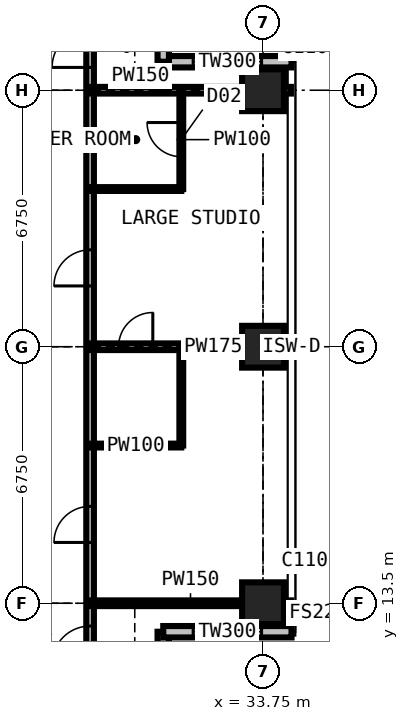
"""IFC4 building model, lengths in metres.
Left out: names, types, materials, properties, quantities, classifications, styles, units other than length and angle.
Written with IfcOpenShell. Run it as: python <this file> out.ifc"""

import sys

from ifc_helpers import new_model, si_unit, direction, frame, frame_2d, origin, origin_2d, place, context, subcontext, project, spatial, rectangle, extrude, element, fill, save


model = new_model("IFC4")
c1 = context("Model", 3, precision=1e-05, world=origin(), true_north=direction((0.0, 1.0)))
c2 = subcontext(c1, "Body", "Model", "MODEL_VIEW")
j1 = project(units=[si_unit("LENGTHUNIT", "METRE"), si_unit("PLANEANGLEUNIT", "RADIAN")], contexts=[c1])
p1 = place(None, origin())
s1 = spatial("IfcSite", under=j1, at=p1, CompositionType="ELEMENT")
p2 = place(p1, origin())
s2 = spatial("IfcBuilding", under=s1, at=p2, CompositionType="ELEMENT")
p3 = place(p2, frame((0.0, 0.0, 215.1)))
s3 = spatial("IfcBuildingStorey", under=s2, at=p3, CompositionType="ELEMENT", Elevation=215.1)
for number, where, z_axis, x_axis in (
    (1, (33.75, 13.5, 0.0), (0.0, 0.0, 1.0), (1.0, 0.0, 0.0)),
    (2, (33.75, 20.25, 0.0), (0.0, 0.0, 1.0), (1.0, 0.0, 0.0)),
    (3, (33.75, 27.0, 0.0), (0.0, 0.0, 1.0), (1.0, 0.0, 0.0)),
):
    element("IfcColumn", number, at=place(p3, frame(where, z_axis=z_axis, x_axis=x_axis)), inside=s3, PredefinedType="COLUMN", context=c2, shape_type="SweptSolid", body=[
        extrude(rectangle(XDim=1.1, YDim=1.1, at=origin_2d()), origin(), (0.0, 0.0, 1.0), 3.6),
    ])
p4 = place(p3, frame((34.5, 27.75, 0.0), z_axis=(0.0, 0.0, 1.0), x_axis=(-1.0, 0.0, 0.0)))
e4 = element("IfcWall", 4, at=p4, inside=s3, PredefinedType="SOLIDWALL", context=c2, shape_type="SweptSolid", body=[
    extrude(rectangle(XDim=3.375, YDim=0.3, at=frame_2d((1.688, 0.0))), origin(), (0.0, 0.0, 1.0), 3.375),
])
p5 = place(p4, frame((0.788, 0.0, 0.6)))
e5 = element("IfcOpeningElement", 5, at=p5, cuts=e4, PredefinedType="OPENING", context=c2, shape_type="SweptSolid", body=[
    extrude(rectangle(XDim=1.8, YDim=2.1, at=frame_2d((0.9, 1.05))), frame((0.0, 0.16, 0.0), z_axis=(0.0, -1.0, 0.0), x_axis=(1.0, 0.0, 0.0)), (0.0, 0.0, 1.0), 0.32),
])
p6 = place(p3, frame((31.125, 27.75, 0.0), z_axis=(0.0, 0.0, 1.0), x_axis=(0.0, 1.0, 0.0)))
e6 = element("IfcWall", 6, at=p6, inside=s3, PredefinedType="SOLIDWALL", context=c2, shape_type="SweptSolid", body=[
    extrude(rectangle(XDim=3.375, YDim=0.3, at=frame_2d((1.688, 0.0))), origin(), (0.0, 0.0, 1.0), 3.375),
])
p7 = place(p6, frame((1.663, 0.0, 0.9)))
e7 = element("IfcOpeningElement", 7, at=p7, cuts=e6, PredefinedType="OPENING", context=c2, shape_type="SweptSolid", body=[
    extrude(rectangle(XDim=1.5, YDim=1.8, at=frame_2d((0.75, 0.9))), frame((0.0, 0.16, 0.0), z_axis=(0.0, -1.0, 0.0), x_axis=(1.0, 0.0, 0.0)), (0.0, 0.0, 1.0), 0.32),
])
p8 = place(p3, frame((31.125, 9.375, 0.0), z_axis=(0.0, 0.0, 1.0), x_axis=(0.0, 1.0, 0.0)))
e8 = element("IfcWall", 8, at=p8, inside=s3, PredefinedType="SOLIDWALL", context=c2, shape_type="SweptSolid", body=[
    extrude(rectangle(XDim=3.375, YDim=0.3, at=frame_2d((1.688, 0.0))), origin(), (0.0, 0.0, 1.0), 3.375),
])
p9 = place(p8, frame((0.788, 0.0, 0.6)))
e9 = element("IfcOpeningElement", 9, at=p9, cuts=e8, PredefinedType="OPENING", context=c2, shape_type="SweptSolid", body=[
    extrude(rectangle(XDim=1.8, YDim=2.1, at=frame_2d((0.9, 1.05))), frame((0.0, 0.16, 0.0), z_axis=(0.0, -1.0, 0.0), x_axis=(1.0, 0.0, 0.0)), (0.0, 0.0, 1.0), 0.32),
])
p10 = place(p3, frame((31.125, 12.75, 0.0), z_axis=(0.0, 0.0, 1.0), x_axis=(1.0, 0.0, 0.0)))
e10 = element("IfcWall", 10, at=p10, inside=s3, PredefinedType="SOLIDWALL", context=c2, shape_type="SweptSolid", body=[
    extrude(rectangle(XDim=3.375, YDim=0.3, at=frame_2d((1.688, 0.0))), origin(), (0.0, 0.0, 1.0), 3.375),
])
p11 = place(p10, frame((0.788, 0.0, 0.6)))
e11 = element("IfcOpeningElement", 11, at=p11, cuts=e10, PredefinedType="OPENING", context=c2, shape_type="SweptSolid", body=[
    extrude(rectangle(XDim=1.8, YDim=2.1, at=frame_2d((0.9, 1.05))), frame((0.0, 0.16, 0.0), z_axis=(0.0, -1.0, 0.0), x_axis=(1.0, 0.0, 0.0)), (0.0, 0.0, 1.0), 0.32),
])
p12 = place(p3, frame((29.2, 11.3, 0.0), z_axis=(0.0, 0.0, 1.0), x_axis=(0.0, 1.0, 0.0)))
e12 = element("IfcWall", 12, at=p12, inside=s3, PredefinedType="PARTITIONING", context=c2, shape_type="SweptSolid", body=[
    extrude(rectangle(XDim=17.9, YDim=0.2, at=frame_2d((8.95, 0.0))), origin(), (0.0, 0.0, 1.0), 3.375),
])
p13 = place(p12, frame((0.6, 0.0, 0.0)))
e13 = element("IfcOpeningElement", 13, at=p13, cuts=e12, PredefinedType="OPENING", context=c2, shape_type="SweptSolid", body=[
    extrude(rectangle(XDim=1.0, YDim=2.2, at=frame_2d((0.5, 1.1))), frame((0.0, 0.11, 0.0), z_axis=(0.0, -1.0, 0.0), x_axis=(1.0, 0.0, 0.0)), (0.0, 0.0, 1.0), 0.22),
])
p14 = place(p12, frame((10.55, 0.0, 0.0)))
e14 = element("IfcOpeningElement", 14, at=p14, cuts=e12, PredefinedType="OPENING", context=c2, shape_type="SweptSolid", body=[
    extrude(rectangle(XDim=0.95, YDim=2.2, at=frame_2d((0.475, 1.1))), frame((0.0, 0.11, 0.0), z_axis=(0.0, -1.0, 0.0), x_axis=(1.0, 0.0, 0.0)), (0.0, 0.0, 1.0), 0.22),
])
p15 = place(p12, frame((3.8, 0.0, 0.0)))
e15 = element("IfcOpeningElement", 15, at=p15, cuts=e12, PredefinedType="OPENING", context=c2, shape_type="SweptSolid", body=[
    extrude(rectangle(XDim=0.95, YDim=2.2, at=frame_2d((0.475, 1.1))), frame((0.0, 0.11, 0.0), z_axis=(0.0, -1.0, 0.0), x_axis=(1.0, 0.0, 0.0)), (0.0, 0.0, 1.0), 0.22),
])
p16 = place(p12, frame((16.3, 0.0, 0.0)))
e16 = element("IfcOpeningElement", 16, at=p16, cuts=e12, PredefinedType="OPENING", context=c2, shape_type="SweptSolid", body=[
    extrude(rectangle(XDim=1.0, YDim=2.2, at=frame_2d((0.5, 1.1))), frame((0.0, 0.11, 0.0), z_axis=(0.0, -1.0, 0.0), x_axis=(1.0, 0.0, 0.0)), (0.0, 0.0, 1.0), 0.22),
])
p17 = place(p3, frame((29.2, 13.5, 0.0), z_axis=(0.0, 0.0, 1.0), x_axis=(1.0, 0.0, 0.0)))
e17 = element("IfcWall", 17, at=p17, inside=s3, PredefinedType="PARTITIONING", context=c2, shape_type="SweptSolid", body=[
    extrude(rectangle(XDim=5.284, YDim=0.15, at=frame_2d((2.642, 0.0))), origin(), (0.0, 0.0, 1.0), 2.877),
])
p18 = place(p3, frame((29.2, 17.65, 0.0), z_axis=(0.0, 0.0, 1.0), x_axis=(1.0, 0.0, 0.0)))
e18 = element("IfcWall", 18, at=p18, inside=s3, PredefinedType="PARTITIONING", context=c2, shape_type="SweptSolid", body=[
    extrude(rectangle(XDim=2.4, YDim=0.1, at=frame_2d((1.2, 0.0))), origin(), (0.0, 0.0, 1.0), 3.375),
])
p19 = place(p3, frame((29.2, 20.25, 0.0), z_axis=(0.0, 0.0, 1.0), x_axis=(1.0, 0.0, 0.0)))
e19 = element("IfcWall", 19, at=p19, inside=s3, PredefinedType="PARTITIONING", context=c2, shape_type="SweptSolid", body=[
    extrude(rectangle(XDim=5.284, YDim=0.175, at=frame_2d((2.642, 0.0))), origin(), (0.0, 0.0, 1.0), 2.877),
])
p20 = place(p19, frame((0.75, 0.0, 0.0)))
e20 = element("IfcOpeningElement", 20, at=p20, cuts=e19, PredefinedType="OPENING", context=c2, shape_type="SweptSolid", body=[
    extrude(rectangle(XDim=0.9, YDim=2.2, at=frame_2d((0.45, 1.1))), frame((0.0, 0.097, 0.0), z_axis=(0.0, -1.0, 0.0), x_axis=(1.0, 0.0, 0.0)), (0.0, 0.0, 1.0), 0.195),
])
p21 = place(p3, frame((29.2, 24.4, 0.0), z_axis=(0.0, 0.0, 1.0), x_axis=(1.0, 0.0, 0.0)))
e21 = element("IfcWall", 21, at=p21, inside=s3, PredefinedType="PARTITIONING", context=c2, shape_type="SweptSolid", body=[
    extrude(rectangle(XDim=2.4, YDim=0.1, at=frame_2d((1.2, 0.0))), origin(), (0.0, 0.0, 1.0), 3.375),
])
p22 = place(p3, frame((29.2, 27.0, 0.0), z_axis=(0.0, 0.0, 1.0), x_axis=(1.0, 0.0, 0.0)))
e22 = element("IfcWall", 22, at=p22, inside=s3, PredefinedType="PARTITIONING", context=c2, shape_type="SweptSolid", body=[
    extrude(rectangle(XDim=5.284, YDim=0.175, at=frame_2d((2.642, 0.0))), origin(), (0.0, 0.0, 1.0), 2.877),
])
p23 = place(p3, frame((31.125, 27.0, 0.0), z_axis=(0.0, 0.0, 1.0), x_axis=(0.0, 1.0, 0.0)))
e23 = element("IfcWall", 23, at=p23, inside=s3, PredefinedType="PARTITIONING", context=c2, shape_type="SweptSolid", body=[
    extrude(rectangle(XDim=0.734, YDim=0.15, at=frame_2d((0.367, 0.0))), origin(), (0.0, 0.0, 1.0), 3.375),
])
p24 = place(p3, frame((31.6, 17.65, 0.0), z_axis=(0.0, 0.0, 1.0), x_axis=(0.0, 1.0, 0.0)))
e24 = element("IfcWall", 24, at=p24, inside=s3, PredefinedType="PARTITIONING", context=c2, shape_type="SweptSolid", body=[
    extrude(rectangle(XDim=2.6, YDim=0.1, at=frame_2d((1.3, 0.0))), origin(), (0.0, 0.0, 1.0), 3.375),
])
p25 = place(p3, frame((31.6, 24.4, 0.0), z_axis=(0.0, 0.0, 1.0), x_axis=(0.0, 1.0, 0.0)))
e25 = element("IfcWall", 25, at=p25, inside=s3, PredefinedType="PARTITIONING", context=c2, shape_type="SweptSolid", body=[
    extrude(rectangle(XDim=2.6, YDim=0.1, at=frame_2d((1.3, 0.0))), origin(), (0.0, 0.0, 1.0), 3.375),
])
p26 = place(p25, frame((0.85, 0.0, 0.0)))
e26 = element("IfcOpeningElement", 26, at=p26, cuts=e25, PredefinedType="OPENING", context=c2, shape_type="SweptSolid", body=[
    extrude(rectangle(XDim=0.9, YDim=2.2, at=frame_2d((0.45, 1.1))), frame((0.0, 0.06, 0.0), z_axis=(0.0, -1.0, 0.0), x_axis=(1.0, 0.0, 0.0)), (0.0, 0.0, 1.0), 0.12),
])
p27 = place(p5, origin())
e27 = element("IfcWindow", 27, at=p27, inside=s3, PartitioningType="SINGLE_PANEL", PredefinedType="WINDOW", context=c2, shape_type="SweptSolid", body=[
    extrude(rectangle(XDim=1.8, YDim=2.1, at=frame_2d((0.9, 1.05))), frame((0.0, 0.03, 0.0), z_axis=(0.0, -1.0, 0.0), x_axis=(1.0, 0.0, 0.0)), (0.0, 0.0, 1.0), 0.06),
])
fill(e5, e27)
p28 = place(p11, origin())
e28 = element("IfcWindow", 28, at=p28, inside=s3, PartitioningType="SINGLE_PANEL", PredefinedType="WINDOW", context=c2, shape_type="SweptSolid", body=[
    extrude(rectangle(XDim=1.8, YDim=2.1, at=frame_2d((0.9, 1.05))), frame((0.0, 0.03, 0.0), z_axis=(0.0, -1.0, 0.0), x_axis=(1.0, 0.0, 0.0)), (0.0, 0.0, 1.0), 0.06),
])
fill(e11, e28)
p29 = place(p13, origin())
e29 = element("IfcDoor", 29, at=p29, inside=s3, OperationType="SINGLE_SWING_LEFT", PredefinedType="DOOR", context=c2, shape_type="SweptSolid", body=[
    extrude(rectangle(XDim=1.0, YDim=2.2, at=frame_2d((0.5, 1.1))), frame((0.0, 0.025, 0.0), z_axis=(0.0, -1.0, 0.0), x_axis=(1.0, 0.0, 0.0)), (0.0, 0.0, 1.0), 0.05),
])
fill(e13, e29)
p30 = place(p14, origin())
e30 = element("IfcDoor", 30, at=p30, inside=s3, OperationType="SINGLE_SWING_LEFT", PredefinedType="DOOR", context=c2, shape_type="SweptSolid", body=[
    extrude(rectangle(XDim=0.95, YDim=2.2, at=frame_2d((0.475, 1.1))), frame((0.0, 0.025, 0.0), z_axis=(0.0, -1.0, 0.0), x_axis=(1.0, 0.0, 0.0)), (0.0, 0.0, 1.0), 0.05),
])
fill(e14, e30)
p31 = place(p26, origin())
e31 = element("IfcDoor", 31, at=p31, inside=s3, OperationType="SINGLE_SWING_RIGHT", PredefinedType="DOOR", context=c2, shape_type="SweptSolid", body=[
    extrude(rectangle(XDim=0.9, YDim=2.2, at=frame_2d((0.45, 1.1))), frame((0.0, 0.025, 0.0), z_axis=(0.0, -1.0, 0.0), x_axis=(1.0, 0.0, 0.0)), (0.0, 0.0, 1.0), 0.05),
])
fill(e26, e31)
p32 = place(p15, origin())
e32 = element("IfcDoor", 32, at=p32, inside=s3, OperationType="SINGLE_SWING_LEFT", PredefinedType="DOOR", context=c2, shape_type="SweptSolid", body=[
    extrude(rectangle(XDim=0.95, YDim=2.2, at=frame_2d((0.475, 1.1))), frame((0.0, 0.025, 0.0), z_axis=(0.0, -1.0, 0.0), x_axis=(1.0, 0.0, 0.0)), (0.0, 0.0, 1.0), 0.05),
])
fill(e15, e32)
p33 = place(p20, origin())
e33 = element("IfcDoor", 33, at=p33, inside=s3, OperationType="SINGLE_SWING_RIGHT", PredefinedType="DOOR", context=c2, shape_type="SweptSolid", body=[
    extrude(rectangle(XDim=0.9, YDim=2.2, at=frame_2d((0.45, 1.1))), frame((0.0, 0.025, 0.0), z_axis=(0.0, -1.0, 0.0), x_axis=(1.0, 0.0, 0.0)), (0.0, 0.0, 1.0), 0.05),
])
fill(e20, e33)
p34 = place(p16, origin())
e34 = element("IfcDoor", 34, at=p34, inside=s3, OperationType="SINGLE_SWING_LEFT", PredefinedType="DOOR", context=c2, shape_type="SweptSolid", body=[
    extrude(rectangle(XDim=1.0, YDim=2.2, at=frame_2d((0.5, 1.1))), frame((0.0, 0.025, 0.0), z_axis=(0.0, -1.0, 0.0), x_axis=(1.0, 0.0, 0.0)), (0.0, 0.0, 1.0), 0.05),
])
fill(e16, e34)
save(model, sys.argv[1])
